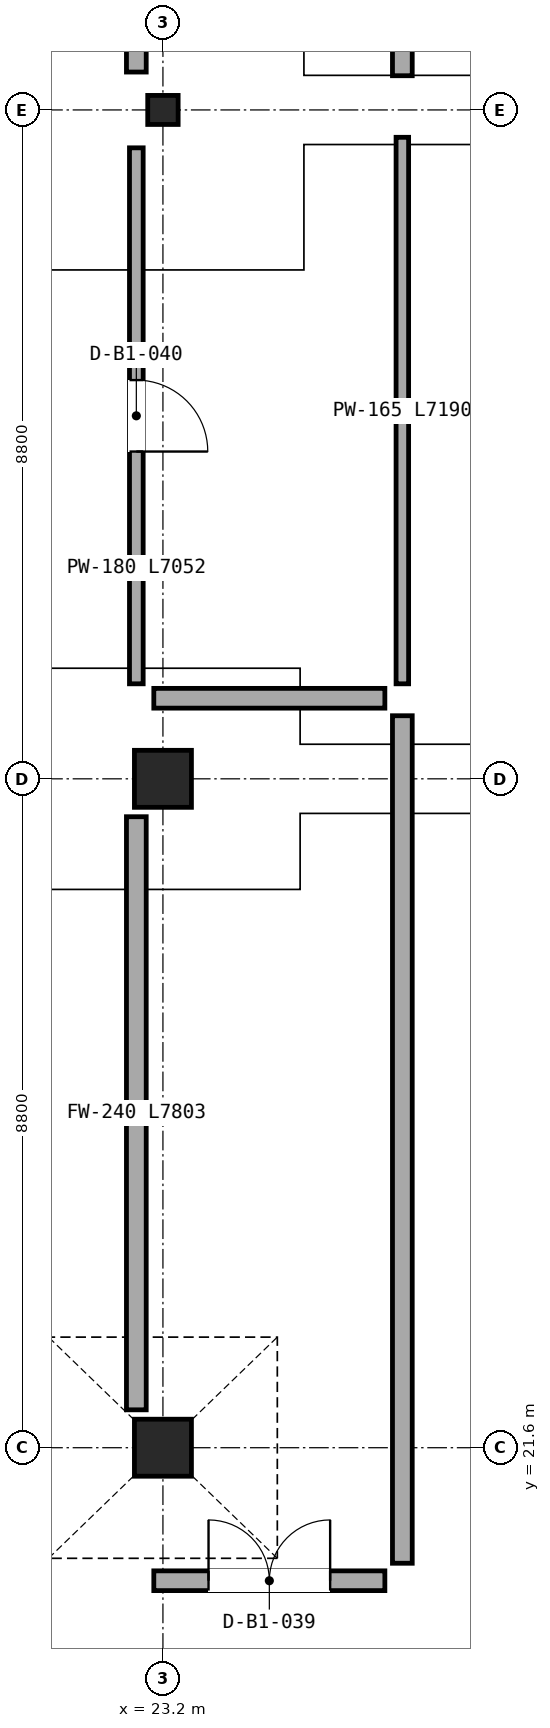
"""IFC4 building model, lengths in metres.
Left out: names, types, materials, properties, quantities, classifications, styles, units other than length and angle.
Written with IfcOpenShell. Run it as: python <this file> out.ifc"""

import sys

from ifc_helpers import new_model, si_unit, direction, frame, frame_2d, origin, origin_2d, place, context, subcontext, project, spatial, rectangle, i_section, extrude, element, fill, save


model = new_model("IFC4")
c1 = context("Model", 3, precision=1e-05, world=origin(), true_north=direction((0.0, 1.0)))
c2 = subcontext(c1, "Body", "Model", "MODEL_VIEW")
j1 = project(units=[si_unit("LENGTHUNIT", "METRE"), si_unit("PLANEANGLEUNIT", "RADIAN")], contexts=[c1])
p1 = place(None, origin())
s1 = spatial("IfcSite", under=j1, at=p1, CompositionType="ELEMENT")
p2 = place(p1, origin())
s2 = spatial("IfcBuilding", under=s1, at=p2, CompositionType="ELEMENT")
p3 = place(p2, frame((0.0, 0.0, -5.4)))
s3 = spatial("IfcBuildingStorey", under=s2, at=p3, CompositionType="ELEMENT", Elevation=-5.4)
for number, where, z_axis, x_axis in (
    (1, (23.2, 21.6, 0.0), (0.0, 0.0, 1.0), (1.0, 0.0, 0.0)),
    (2, (23.2, 30.4, 0.0), (0.0, 0.0, 1.0), (1.0, 0.0, 0.0)),
):
    element("IfcColumn", number, at=place(p3, frame(where, z_axis=z_axis, x_axis=x_axis)), inside=s3, PredefinedType="COLUMN", context=c2, shape_type="SweptSolid", body=[
        extrude(rectangle(XDim=0.75, YDim=0.75, at=origin_2d()), origin(), (0.0, 0.0, 1.0), 5.4),
    ])
p4 = place(p3, frame((23.2, 39.2, 0.0), z_axis=(0.0, 0.0, 1.0), x_axis=(1.0, 0.0, 0.0)))
e3 = element("IfcColumn", 3, at=p4, inside=s3, PredefinedType="COLUMN", context=c2, shape_type="SweptSolid", body=[
    extrude(i_section(OverallWidth=0.4, OverallDepth=0.382, WebThickness=0.025, FlangeThickness=0.036, at=origin_2d()), origin(), (0.0, 0.0, 1.0), 5.4),
])
p5 = place(p3, frame((22.85, 39.698, 0.0), z_axis=(0.0, 0.0, 1.0), x_axis=(0.0, 1.0, 0.0)))
e4 = element("IfcWall", 4, at=p5, inside=s3, PredefinedType="SOLIDWALL", context=c2, shape_type="SweptSolid", body=[
    extrude(rectangle(XDim=7.803, YDim=0.26, at=frame_2d((3.901, 0.0))), origin(), (0.0, 0.0, 1.0), 5.03),
])
p6 = place(p5, frame((0.296, 0.0, 0.0)))
e5 = element("IfcOpeningElement", 5, at=p6, cuts=e4, PredefinedType="OPENING", context=c2, shape_type="SweptSolid", body=[
    extrude(rectangle(XDim=0.9, YDim=2.08, at=frame_2d((0.45, 1.04))), frame((0.0, 0.14, 0.0), z_axis=(0.0, -1.0, 0.0), x_axis=(1.0, 0.0, 0.0)), (0.0, 0.0, 1.0), 0.28),
])
p7 = place(p3, frame((26.35, 50.92, 0.0), z_axis=(0.0, 0.0, 1.0), x_axis=(0.0, -1.0, 0.0)))
e6 = element("IfcWall", 6, at=p7, inside=s3, PredefinedType="SOLIDWALL", context=c2, shape_type="SweptSolid", body=[
    extrude(rectangle(XDim=11.27, YDim=0.26, at=frame_2d((5.635, 0.0))), origin(), (0.0, 0.0, 1.0), 4.458),
])
p8 = place(p3, frame((26.12, 19.85, 0.0), z_axis=(0.0, 0.0, 1.0), x_axis=(-1.0, 0.0, 0.0)))
e7 = element("IfcWall", 7, at=p8, inside=s3, PredefinedType="SOLIDWALL", context=c2, shape_type="SweptSolid", body=[
    extrude(rectangle(XDim=3.04, YDim=0.26, at=frame_2d((1.52, 0.0))), origin(), (0.0, 0.0, 1.0), 4.507),
])
p9 = place(p8, frame((0.72, 0.0, 0.0)))
e8 = element("IfcOpeningElement", 8, at=p9, cuts=e7, PredefinedType="OPENING", context=c2, shape_type="SweptSolid", body=[
    extrude(rectangle(XDim=1.6, YDim=2.4, at=frame_2d((0.8, 1.2))), frame((0.0, 0.14, 0.0), z_axis=(0.0, -1.0, 0.0), x_axis=(1.0, 0.0, 0.0)), (0.0, 0.0, 1.0), 0.28),
])
p10 = place(p3, frame((22.85, 22.098, 0.0), z_axis=(0.0, 0.0, 1.0), x_axis=(0.0, 1.0, 0.0)))
e9 = element("IfcWall", 9, at=p10, inside=s3, PredefinedType="SOLIDWALL", context=c2, shape_type="SweptSolid", body=[
    extrude(rectangle(XDim=7.803, YDim=0.26, at=frame_2d((3.902, 0.0))), origin(), (0.0, 0.0, 1.0), 5.03),
])
p11 = place(p3, frame((26.35, 31.23, 0.0), z_axis=(0.0, 0.0, 1.0), x_axis=(0.0, -1.0, 0.0)))
e10 = element("IfcWall", 10, at=p11, inside=s3, PredefinedType="SOLIDWALL", context=c2, shape_type="SweptSolid", body=[
    extrude(rectangle(XDim=11.15, YDim=0.26, at=frame_2d((5.575, 0.0))), origin(), (0.0, 0.0, 1.0), 4.428),
])
p12 = place(p3, frame((22.85, 31.65, 0.0), z_axis=(0.0, 0.0, 1.0), x_axis=(0.0, 1.0, 0.0)))
e11 = element("IfcWall", 11, at=p12, inside=s3, PredefinedType="PARTITIONING", context=c2, shape_type="SweptSolid", body=[
    extrude(rectangle(XDim=7.052, YDim=0.18, at=frame_2d((3.526, 0.0))), origin(), (0.0, 0.0, 1.0), 5.03),
])
p13 = place(p12, frame((3.056, 0.0, 0.0)))
e12 = element("IfcOpeningElement", 12, at=p13, cuts=e11, PredefinedType="OPENING", context=c2, shape_type="SweptSolid", body=[
    extrude(rectangle(XDim=0.94, YDim=2.08, at=frame_2d((0.47, 1.04))), frame((0.0, 0.1, 0.0), z_axis=(0.0, -1.0, 0.0), x_axis=(1.0, 0.0, 0.0)), (0.0, 0.0, 1.0), 0.2),
])
p14 = place(p3, frame((26.35, 38.84, 0.0), z_axis=(0.0, 0.0, 1.0), x_axis=(0.0, -1.0, 0.0)))
e13 = element("IfcWall", 13, at=p14, inside=s3, PredefinedType="PARTITIONING", context=c2, shape_type="SweptSolid", body=[
    extrude(rectangle(XDim=7.19, YDim=0.165, at=frame_2d((3.595, 0.0))), origin(), (0.0, 0.0, 1.0), 5.03),
])
p15 = place(p3, frame((23.08, 31.46, 0.0), z_axis=(0.0, 0.0, 1.0), x_axis=(1.0, 0.0, 0.0)))
e14 = element("IfcWall", 14, at=p15, inside=s3, PredefinedType="SOLIDWALL", context=c2, shape_type="SweptSolid", body=[
    extrude(rectangle(XDim=3.04, YDim=0.26, at=frame_2d((1.52, 0.0))), origin(), (0.0, 0.0, 1.0), 4.507),
])
p16 = place(p9, frame((1.6, 0.0, 0.0), z_axis=(0.0, 0.0, 1.0), x_axis=(-1.0, 0.0, 0.0)))
e15 = element("IfcDoor", 15, at=p16, inside=s3, OperationType="DOUBLE_DOOR_SINGLE_SWING", PredefinedType="DOOR", context=c2, shape_type="SweptSolid", body=[
    extrude(rectangle(XDim=1.6, YDim=2.4, at=frame_2d((0.8, 1.2))), frame((0.0, 0.025, 0.0), z_axis=(0.0, -1.0, 0.0), x_axis=(1.0, 0.0, 0.0)), (0.0, 0.0, 1.0), 0.05),
])
fill(e8, e15)
p17 = place(p13, frame((0.94, 0.0, 0.0), z_axis=(0.0, 0.0, 1.0), x_axis=(-1.0, 0.0, 0.0)))
e16 = element("IfcDoor", 16, at=p17, inside=s3, OperationType="SINGLE_SWING_LEFT", PredefinedType="DOOR", context=c2, shape_type="SweptSolid", body=[
    extrude(rectangle(XDim=0.94, YDim=2.08, at=frame_2d((0.47, 1.04))), frame((0.0, 0.025, 0.0), z_axis=(0.0, -1.0, 0.0), x_axis=(1.0, 0.0, 0.0)), (0.0, 0.0, 1.0), 0.05),
])
fill(e12, e16)
save(model, sys.argv[1])
